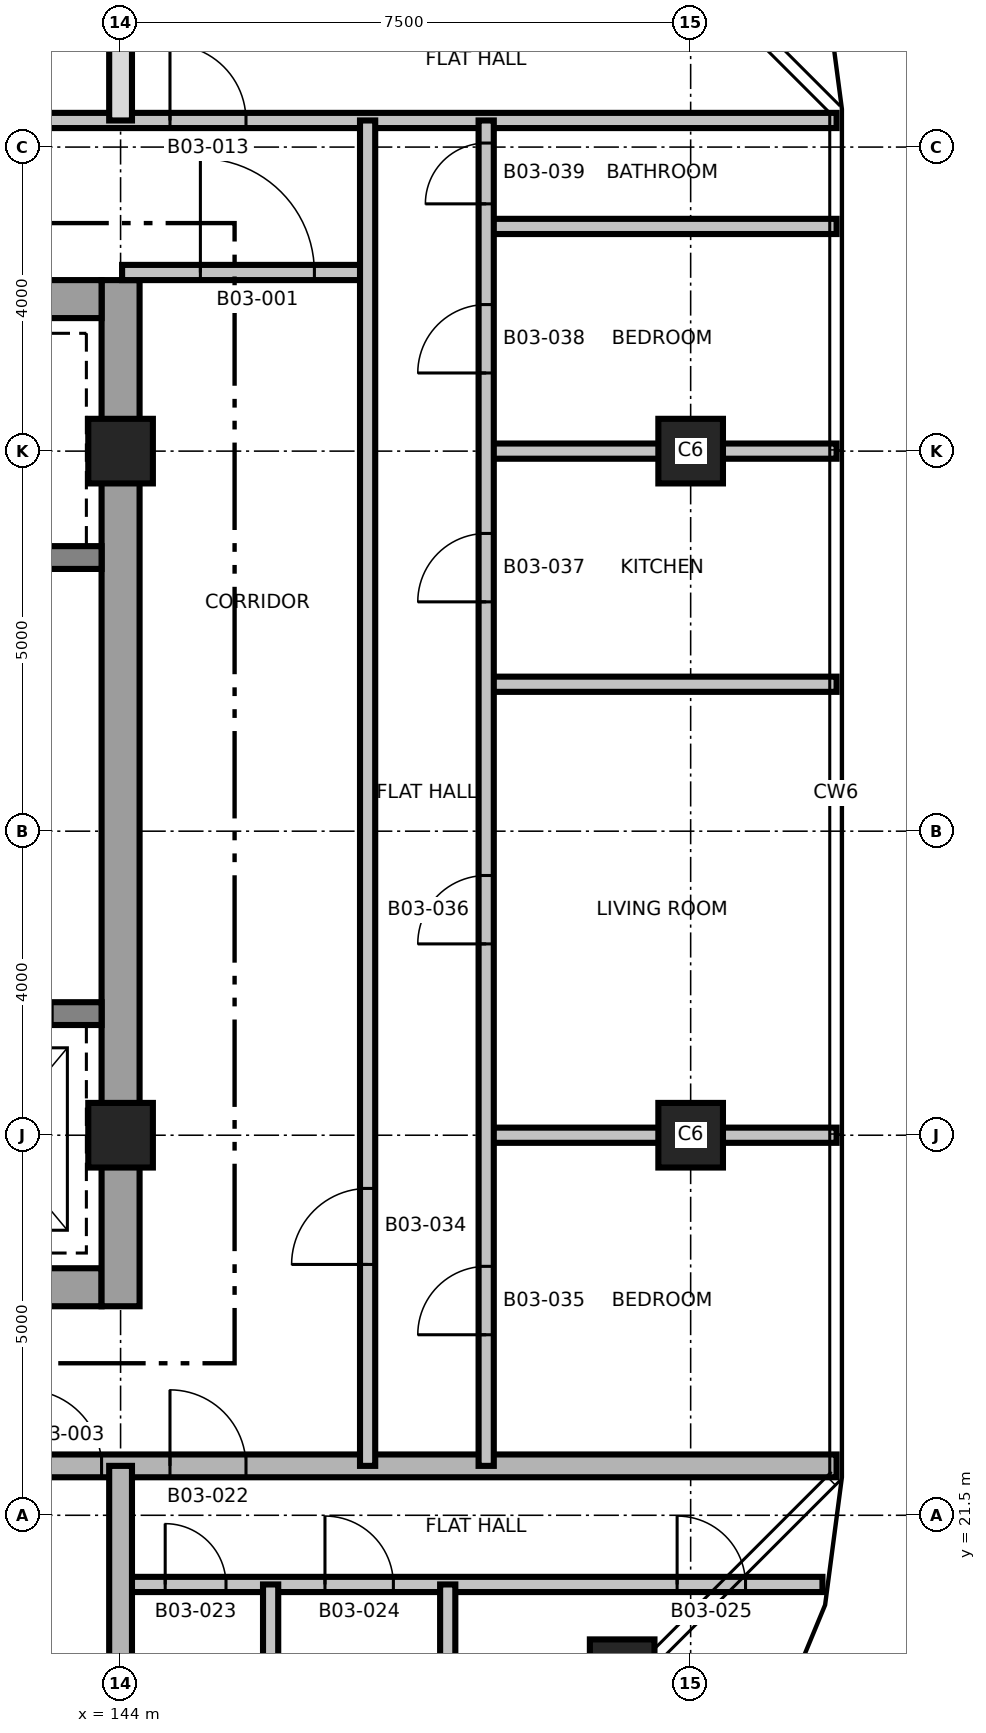
"""IFC4 building model, lengths in metres.
Left out: names, types, materials, properties, quantities, classifications, styles, units other than length and angle.
Written with IfcOpenShell. Run it as: python <this file> out.ifc"""

import sys

from ifc_helpers import new_model, si_unit, direction, frame, frame_2d, origin, origin_2d, place, context, subcontext, project, spatial, rectangle, extrude, element, fill, save


model = new_model("IFC4")
c1 = context("Model", 3, precision=1e-05, world=origin(), true_north=direction((0.0, 1.0)))
c2 = subcontext(c1, "Body", "Model", "MODEL_VIEW")
j1 = project(units=[si_unit("LENGTHUNIT", "METRE"), si_unit("PLANEANGLEUNIT", "RADIAN")], contexts=[c1])
p1 = place(None, origin())
s1 = spatial("IfcSite", under=j1, at=p1, CompositionType="ELEMENT")
p2 = place(p1, origin())
s2 = spatial("IfcBuilding", under=s1, at=p2, CompositionType="ELEMENT")
p3 = place(p2, frame((0.0, 0.0, 59.4)))
s3 = spatial("IfcBuildingStorey", under=s2, at=p3, CompositionType="ELEMENT", Elevation=59.4)
p4 = place(p3, frame((128.75, 24.5, 0.0), z_axis=(0.0, 0.0, 1.0), x_axis=(1.0, 0.0, 0.0)))
e1 = element("IfcWall", 1, at=p4, inside=s3, PredefinedType="SHEAR", context=c2, shape_type="SweptSolid", body=[
    extrude(rectangle(XDim=15.0, YDim=0.5, at=frame_2d((7.5, 0.0))), origin(), (0.0, 0.0, 1.0), 3.7),
])
p5 = place(p4, frame((9.65, 0.0, 0.0)))
e2 = element("IfcOpeningElement", 2, at=p5, cuts=e1, PredefinedType="OPENING", context=c2, shape_type="SweptSolid", body=[
    extrude(rectangle(XDim=1.5, YDim=2.1, at=frame_2d((0.75, 1.05))), frame((0.0, 0.26, 0.0), z_axis=(0.0, -1.0, 0.0), x_axis=(1.0, 0.0, 0.0)), (0.0, 0.0, 1.0), 0.52),
])
p6 = place(p4, frame((1.25, 0.0, 0.0)))
e3 = element("IfcOpeningElement", 3, at=p6, cuts=e1, PredefinedType="OPENING", context=c2, shape_type="SweptSolid", body=[
    extrude(rectangle(XDim=0.9, YDim=2.1, at=frame_2d((0.45, 1.05))), frame((0.0, 0.26, 0.0), z_axis=(0.0, -1.0, 0.0), x_axis=(1.0, 0.0, 0.0)), (0.0, 0.0, 1.0), 0.52),
])
p7 = place(p3, frame((144.0, 24.25, 0.0), z_axis=(0.0, 0.0, 1.0), x_axis=(0.0, 1.0, 0.0)))
e4 = element("IfcWall", 4, at=p7, inside=s3, PredefinedType="SHEAR", context=c2, shape_type="SweptSolid", body=[
    extrude(rectangle(XDim=13.5, YDim=0.5, at=frame_2d((6.75, 0.0))), origin(), (0.0, 0.0, 1.0), 3.7),
])
p8 = place(p3, frame((128.75, 37.5, 0.0), z_axis=(0.0, 0.0, 1.0), x_axis=(1.0, 0.0, 0.0)))
e5 = element("IfcWall", 5, at=p8, inside=s3, PredefinedType="SHEAR", context=c2, shape_type="SweptSolid", body=[
    extrude(rectangle(XDim=15.0, YDim=0.5, at=frame_2d((7.5, 0.0))), origin(), (0.0, 0.0, 1.0), 3.7),
])
p9 = place(p8, frame((9.65, 0.0, 0.0)))
e6 = element("IfcOpeningElement", 6, at=p9, cuts=e5, PredefinedType="OPENING", context=c2, shape_type="SweptSolid", body=[
    extrude(rectangle(XDim=1.5, YDim=2.1, at=frame_2d((0.75, 1.05))), frame((0.0, 0.26, 0.0), z_axis=(0.0, -1.0, 0.0), x_axis=(1.0, 0.0, 0.0)), (0.0, 0.0, 1.0), 0.52),
])
p10 = place(p8, frame((12.85, 0.0, 0.0)))
e7 = element("IfcOpeningElement", 7, at=p10, cuts=e5, PredefinedType="OPENING", context=c2, shape_type="SweptSolid", body=[
    extrude(rectangle(XDim=0.9, YDim=2.1, at=frame_2d((0.45, 1.05))), frame((0.0, 0.26, 0.0), z_axis=(0.0, -1.0, 0.0), x_axis=(1.0, 0.0, 0.0)), (0.0, 0.0, 1.0), 0.52),
])
p11 = place(p8, frame((3.8, 0.0, 0.0)))
e8 = element("IfcOpeningElement", 8, at=p11, cuts=e5, PredefinedType="OPENING", context=c2, shape_type="SweptSolid", body=[
    extrude(rectangle(XDim=0.9, YDim=2.1, at=frame_2d((0.45, 1.05))), frame((0.0, 0.26, 0.0), z_axis=(0.0, -1.0, 0.0), x_axis=(1.0, 0.0, 0.0)), (0.0, 0.0, 1.0), 0.52),
])
p12 = place(p8, frame((6.7, 0.0, 0.0)))
e9 = element("IfcOpeningElement", 9, at=p12, cuts=e5, PredefinedType="OPENING", context=c2, shape_type="SweptSolid", body=[
    extrude(rectangle(XDim=0.9, YDim=2.1, at=frame_2d((0.45, 1.05))), frame((0.0, 0.26, 0.0), z_axis=(0.0, -1.0, 0.0), x_axis=(1.0, 0.0, 0.0)), (0.0, 0.0, 1.0), 0.52),
])
p13 = place(p3, frame((141.05, 28.1, 0.0), z_axis=(0.0, 0.0, 1.0), x_axis=(1.0, 0.0, 0.0)))
e10 = element("IfcWall", 10, at=p13, inside=s3, PredefinedType="SHEAR", context=c2, shape_type="SweptSolid", body=[
    extrude(rectangle(XDim=2.7, YDim=0.3, at=frame_2d((1.35, 0.0))), origin(), (0.0, 0.0, 1.0), 3.7),
])
p14 = place(p13, frame((0.75, 0.0, 0.0)))
e11 = element("IfcOpeningElement", 11, at=p14, cuts=e10, PredefinedType="OPENING", context=c2, shape_type="SweptSolid", body=[
    extrude(rectangle(XDim=1.3, YDim=2.4, at=frame_2d((0.65, 1.2))), frame((0.0, 0.16, 0.0), z_axis=(0.0, -1.0, 0.0), x_axis=(1.0, 0.0, 0.0)), (0.0, 0.0, 1.0), 0.32),
])
p15 = place(p3, frame((141.05, 34.1, 0.0), z_axis=(0.0, 0.0, 1.0), x_axis=(1.0, 0.0, 0.0)))
e12 = element("IfcWall", 12, at=p15, inside=s3, PredefinedType="SHEAR", context=c2, shape_type="SweptSolid", body=[
    extrude(rectangle(XDim=2.7, YDim=0.3, at=frame_2d((1.35, 0.0))), origin(), (0.0, 0.0, 1.0), 3.7),
])
for number, where, z_axis, x_axis in (
    (13, (150.599, 19.442, 0.0), (0.0, 0.0, 1.0), (1.0, 0.0, 0.0)),
    (14, (144.0, 26.5, 0.0), (0.0, 0.0, 1.0), (1.0, 0.0, 0.0)),
    (15, (151.5, 26.5, 0.0), (0.0, 0.0, 1.0), (1.0, 0.0, 0.0)),
    (16, (144.0, 35.5, 0.0), (0.0, 0.0, 1.0), (1.0, 0.0, 0.0)),
    (17, (151.5, 35.5, 0.0), (0.0, 0.0, 1.0), (1.0, 0.0, 0.0)),
):
    element("IfcColumn", number, at=place(p3, frame(where, z_axis=z_axis, x_axis=x_axis)), inside=s3, PredefinedType="COLUMN", context=c2, shape_type="SweptSolid", body=[
        extrude(rectangle(XDim=0.85, YDim=0.85, at=origin_2d()), origin(), (0.0, 0.0, 1.0), 3.7),
    ])
p16 = place(p3, frame((144.0, 20.59, 0.0), z_axis=(0.0, 0.0, 1.0), x_axis=(1.0, 0.0, 0.0)))
e18 = element("IfcWall", 18, at=p16, inside=s3, PredefinedType="PARTITIONING", context=c2, shape_type="SweptSolid", body=[
    extrude(rectangle(XDim=9.234, YDim=0.2, at=frame_2d((4.617, 0.0))), origin(), (0.0, 0.0, 1.0), 3.4),
])
p17 = place(p16, frame((0.587, 0.0, 0.0)))
e19 = element("IfcOpeningElement", 19, at=p17, cuts=e18, PredefinedType="OPENING", context=c2, shape_type="SweptSolid", body=[
    extrude(rectangle(XDim=0.8, YDim=2.1, at=frame_2d((0.4, 1.05))), frame((0.0, 0.11, 0.0), z_axis=(0.0, -1.0, 0.0), x_axis=(1.0, 0.0, 0.0)), (0.0, 0.0, 1.0), 0.22),
])
p18 = place(p16, frame((2.689, 0.0, 0.0)))
e20 = element("IfcOpeningElement", 20, at=p18, cuts=e18, PredefinedType="OPENING", context=c2, shape_type="SweptSolid", body=[
    extrude(rectangle(XDim=0.9, YDim=2.1, at=frame_2d((0.45, 1.05))), frame((0.0, 0.11, 0.0), z_axis=(0.0, -1.0, 0.0), x_axis=(1.0, 0.0, 0.0)), (0.0, 0.0, 1.0), 0.22),
])
p19 = place(p16, frame((7.322, 0.0, 0.0)))
e21 = element("IfcOpeningElement", 21, at=p19, cuts=e18, PredefinedType="OPENING", context=c2, shape_type="SweptSolid", body=[
    extrude(rectangle(XDim=0.9, YDim=2.1, at=frame_2d((0.45, 1.05))), frame((0.0, 0.11, 0.0), z_axis=(0.0, -1.0, 0.0), x_axis=(1.0, 0.0, 0.0)), (0.0, 0.0, 1.0), 0.22),
])
p20 = place(p3, frame((119.58, 22.15, 0.0), z_axis=(0.0, 0.0, 1.0), x_axis=(1.0, 0.0, 0.0)))
e22 = element("IfcWall", 22, at=p20, inside=s3, PredefinedType="SHEAR", context=c2, shape_type="SweptSolid", body=[
    extrude(rectangle(XDim=33.84, YDim=0.3, at=frame_2d((16.92, 0.0))), origin(), (0.0, 0.0, 1.0), 3.4),
])
p21 = place(p20, frame((23.17, 0.0, 0.0)))
e23 = element("IfcOpeningElement", 23, at=p21, cuts=e22, PredefinedType="OPENING", context=c2, shape_type="SweptSolid", body=[
    extrude(rectangle(XDim=1.0, YDim=2.1, at=frame_2d((0.5, 1.05))), frame((0.0, 0.16, 0.0), z_axis=(0.0, -1.0, 0.0), x_axis=(1.0, 0.0, 0.0)), (0.0, 0.0, 1.0), 0.32),
])
p22 = place(p20, frame((11.52, 0.0, 0.0)))
e24 = element("IfcOpeningElement", 24, at=p22, cuts=e22, PredefinedType="OPENING", context=c2, shape_type="SweptSolid", body=[
    extrude(rectangle(XDim=1.0, YDim=2.1, at=frame_2d((0.5, 1.05))), frame((0.0, 0.16, 0.0), z_axis=(0.0, -1.0, 0.0), x_axis=(1.0, 0.0, 0.0)), (0.0, 0.0, 1.0), 0.32),
])
p23 = place(p20, frame((25.07, 0.0, 0.0)))
e25 = element("IfcOpeningElement", 25, at=p23, cuts=e22, PredefinedType="OPENING", context=c2, shape_type="SweptSolid", body=[
    extrude(rectangle(XDim=1.0, YDim=2.1, at=frame_2d((0.5, 1.05))), frame((0.0, 0.16, 0.0), z_axis=(0.0, -1.0, 0.0), x_axis=(1.0, 0.0, 0.0)), (0.0, 0.0, 1.0), 0.32),
])
p24 = place(p20, frame((17.17, 0.0, 0.0)))
e26 = element("IfcOpeningElement", 26, at=p24, cuts=e22, PredefinedType="OPENING", context=c2, shape_type="SweptSolid", body=[
    extrude(rectangle(XDim=0.9, YDim=2.1, at=frame_2d((0.45, 1.05))), frame((0.0, 0.16, 0.0), z_axis=(0.0, -1.0, 0.0), x_axis=(1.0, 0.0, 0.0)), (0.0, 0.0, 1.0), 0.32),
])
for number, where, z_axis, x_axis in (
    (27, (148.81, 26.5, 0.0), (0.0, 0.0, 1.0), (1.0, 0.0, 0.0)),
    (28, (148.81, 32.433, 0.0), (0.0, 0.0, 1.0), (1.0, 0.0, 0.0)),
    (29, (148.81, 35.5, 0.0), (0.0, 0.0, 1.0), (1.0, 0.0, 0.0)),
):
    element("IfcWall", number, at=place(p3, frame(where, z_axis=z_axis, x_axis=x_axis)), inside=s3, PredefinedType="PARTITIONING", context=c2, shape_type="SweptSolid", body=[
        extrude(rectangle(XDim=4.61, YDim=0.2, at=frame_2d((2.305, 0.0))), origin(), (0.0, 0.0, 1.0), 3.4),
    ])
p25 = place(p3, frame((144.02, 37.85, 0.0), z_axis=(0.0, 0.0, 1.0), x_axis=(1.0, 0.0, 0.0)))
e30 = element("IfcWall", 30, at=p25, inside=s3, PredefinedType="PARTITIONING", context=c2, shape_type="SweptSolid", body=[
    extrude(rectangle(XDim=3.23, YDim=0.2, at=frame_2d((1.615, 0.0))), origin(), (0.0, 0.0, 1.0), 3.4),
])
p26 = place(p25, frame((1.03, 0.0, 0.0)))
e31 = element("IfcOpeningElement", 31, at=p26, cuts=e30, PredefinedType="OPENING", context=c2, shape_type="SweptSolid", body=[
    extrude(rectangle(XDim=1.5, YDim=2.1, at=frame_2d((0.75, 1.05))), frame((0.0, 0.11, 0.0), z_axis=(0.0, -1.0, 0.0), x_axis=(1.0, 0.0, 0.0)), (0.0, 0.0, 1.0), 0.22),
])
p27 = place(p3, frame((148.81, 38.456, 0.0), z_axis=(0.0, 0.0, 1.0), x_axis=(1.0, 0.0, 0.0)))
e32 = element("IfcWall", 32, at=p27, inside=s3, PredefinedType="PARTITIONING", context=c2, shape_type="SweptSolid", body=[
    extrude(rectangle(XDim=4.61, YDim=0.2, at=frame_2d((2.305, 0.0))), origin(), (0.0, 0.0, 1.0), 3.4),
])
p28 = place(p3, frame((119.58, 39.85, 0.0), z_axis=(0.0, 0.0, 1.0), x_axis=(1.0, 0.0, 0.0)))
e33 = element("IfcWall", 33, at=p28, inside=s3, PredefinedType="PARTITIONING", context=c2, shape_type="SweptSolid", body=[
    extrude(rectangle(XDim=33.84, YDim=0.2, at=frame_2d((16.92, 0.0))), origin(), (0.0, 0.0, 1.0), 3.4),
])
p29 = place(p28, frame((15.27, 0.0, 0.0)))
e34 = element("IfcOpeningElement", 34, at=p29, cuts=e33, PredefinedType="OPENING", context=c2, shape_type="SweptSolid", body=[
    extrude(rectangle(XDim=1.0, YDim=2.1, at=frame_2d((0.5, 1.05))), frame((0.0, 0.11, 0.0), z_axis=(0.0, -1.0, 0.0), x_axis=(1.0, 0.0, 0.0)), (0.0, 0.0, 1.0), 0.22),
])
p30 = place(p28, frame((25.07, 0.0, 0.0)))
e35 = element("IfcOpeningElement", 35, at=p30, cuts=e33, PredefinedType="OPENING", context=c2, shape_type="SweptSolid", body=[
    extrude(rectangle(XDim=1.0, YDim=2.1, at=frame_2d((0.5, 1.05))), frame((0.0, 0.11, 0.0), z_axis=(0.0, -1.0, 0.0), x_axis=(1.0, 0.0, 0.0)), (0.0, 0.0, 1.0), 0.22),
])
p31 = place(p3, frame((144.0, 15.58, 0.0), z_axis=(0.0, 0.0, 1.0), x_axis=(0.0, 1.0, 0.0)))
e36 = element("IfcWall", 36, at=p31, inside=s3, PredefinedType="SHEAR", context=c2, shape_type="SweptSolid", body=[
    extrude(rectangle(XDim=6.57, YDim=0.3, at=frame_2d((3.285, 0.0))), origin(), (0.0, 0.0, 1.0), 3.4),
])
p32 = place(p3, frame((144.0, 39.85, 0.0), z_axis=(0.0, 0.0, 1.0), x_axis=(0.0, 1.0, 0.0)))
e37 = element("IfcWall", 37, at=p32, inside=s3, PredefinedType="PARTITIONING", context=c2, shape_type="SweptSolid", body=[
    extrude(rectangle(XDim=6.57, YDim=0.3, at=frame_2d((3.285, 0.0))), origin(), (0.0, 0.0, 1.0), 3.4),
])
p33 = place(p3, frame((145.974, 15.58, 0.0), z_axis=(0.0, 0.0, 1.0), x_axis=(0.0, 1.0, 0.0)))
e38 = element("IfcWall", 38, at=p33, inside=s3, PredefinedType="PARTITIONING", context=c2, shape_type="SweptSolid", body=[
    extrude(rectangle(XDim=5.01, YDim=0.2, at=frame_2d((2.505, 0.0))), origin(), (0.0, 0.0, 1.0), 3.4),
])
p34 = place(p3, frame((147.25, 22.15, 0.0), z_axis=(0.0, 0.0, 1.0), x_axis=(0.0, 1.0, 0.0)))
e39 = element("IfcWall", 39, at=p34, inside=s3, PredefinedType="PARTITIONING", context=c2, shape_type="SweptSolid", body=[
    extrude(rectangle(XDim=17.7, YDim=0.2, at=frame_2d((8.85, 0.0))), origin(), (0.0, 0.0, 1.0), 3.4),
])
p35 = place(p34, frame((2.65, 0.0, 0.0)))
e40 = element("IfcOpeningElement", 40, at=p35, cuts=e39, PredefinedType="OPENING", context=c2, shape_type="SweptSolid", body=[
    extrude(rectangle(XDim=1.0, YDim=2.1, at=frame_2d((0.5, 1.05))), frame((0.0, 0.11, 0.0), z_axis=(0.0, -1.0, 0.0), x_axis=(1.0, 0.0, 0.0)), (0.0, 0.0, 1.0), 0.22),
])
p36 = place(p3, frame((148.304, 15.752, 0.0), z_axis=(0.0, 0.0, 1.0), x_axis=(0.0, 1.0, 0.0)))
e41 = element("IfcWall", 41, at=p36, inside=s3, PredefinedType="PARTITIONING", context=c2, shape_type="SweptSolid", body=[
    extrude(rectangle(XDim=4.838, YDim=0.2, at=frame_2d((2.419, 0.0))), origin(), (0.0, 0.0, 1.0), 3.4),
])
p37 = place(p3, frame((148.81, 22.15, 0.0), z_axis=(0.0, 0.0, 1.0), x_axis=(0.0, 1.0, 0.0)))
e42 = element("IfcWall", 42, at=p37, inside=s3, PredefinedType="PARTITIONING", context=c2, shape_type="SweptSolid", body=[
    extrude(rectangle(XDim=17.7, YDim=0.2, at=frame_2d((8.85, 0.0))), origin(), (0.0, 0.0, 1.0), 3.4),
])
p38 = place(p37, frame((1.725, 0.0, 0.0)))
e43 = element("IfcOpeningElement", 43, at=p38, cuts=e42, PredefinedType="OPENING", context=c2, shape_type="SweptSolid", body=[
    extrude(rectangle(XDim=0.9, YDim=2.1, at=frame_2d((0.45, 1.05))), frame((0.0, 0.11, 0.0), z_axis=(0.0, -1.0, 0.0), x_axis=(1.0, 0.0, 0.0)), (0.0, 0.0, 1.0), 0.22),
])
p39 = place(p37, frame((6.867, 0.0, 0.0)))
e44 = element("IfcOpeningElement", 44, at=p39, cuts=e42, PredefinedType="OPENING", context=c2, shape_type="SweptSolid", body=[
    extrude(rectangle(XDim=0.9, YDim=2.1, at=frame_2d((0.45, 1.05))), frame((0.0, 0.11, 0.0), z_axis=(0.0, -1.0, 0.0), x_axis=(1.0, 0.0, 0.0)), (0.0, 0.0, 1.0), 0.22),
])
p40 = place(p37, frame((11.367, 0.0, 0.0)))
e45 = element("IfcOpeningElement", 45, at=p40, cuts=e42, PredefinedType="OPENING", context=c2, shape_type="SweptSolid", body=[
    extrude(rectangle(XDim=0.9, YDim=2.1, at=frame_2d((0.45, 1.05))), frame((0.0, 0.11, 0.0), z_axis=(0.0, -1.0, 0.0), x_axis=(1.0, 0.0, 0.0)), (0.0, 0.0, 1.0), 0.22),
])
p41 = place(p37, frame((14.378, 0.0, 0.0)))
e46 = element("IfcOpeningElement", 46, at=p41, cuts=e42, PredefinedType="OPENING", context=c2, shape_type="SweptSolid", body=[
    extrude(rectangle(XDim=0.9, YDim=2.1, at=frame_2d((0.45, 1.05))), frame((0.0, 0.11, 0.0), z_axis=(0.0, -1.0, 0.0), x_axis=(1.0, 0.0, 0.0)), (0.0, 0.0, 1.0), 0.22),
])
p42 = place(p37, frame((16.603, 0.0, 0.0)))
e47 = element("IfcOpeningElement", 47, at=p42, cuts=e42, PredefinedType="OPENING", context=c2, shape_type="SweptSolid", body=[
    extrude(rectangle(XDim=0.8, YDim=2.1, at=frame_2d((0.4, 1.05))), frame((0.0, 0.11, 0.0), z_axis=(0.0, -1.0, 0.0), x_axis=(1.0, 0.0, 0.0)), (0.0, 0.0, 1.0), 0.22),
])
p43 = place(p26, origin())
e48 = element("IfcDoor", 48, at=p43, inside=s3, OperationType="SINGLE_SWING_LEFT", PredefinedType="DOOR", context=c2, shape_type="SweptSolid", body=[
    extrude(rectangle(XDim=1.5, YDim=2.1, at=frame_2d((0.75, 1.05))), frame((0.0, 0.025, 0.0), z_axis=(0.0, -1.0, 0.0), x_axis=(1.0, 0.0, 0.0)), (0.0, 0.0, 1.0), 0.05),
])
fill(e31, e48)
p44 = place(p21, origin())
e49 = element("IfcDoor", 49, at=p44, inside=s3, OperationType="SINGLE_SWING_LEFT", PredefinedType="DOOR", context=c2, shape_type="SweptSolid", body=[
    extrude(rectangle(XDim=1.0, YDim=2.1, at=frame_2d((0.5, 1.05))), frame((0.0, 0.025, 0.0), z_axis=(0.0, -1.0, 0.0), x_axis=(1.0, 0.0, 0.0)), (0.0, 0.0, 1.0), 0.05),
])
fill(e23, e49)
p45 = place(p30, origin())
e50 = element("IfcDoor", 50, at=p45, inside=s3, OperationType="SINGLE_SWING_LEFT", PredefinedType="DOOR", context=c2, shape_type="SweptSolid", body=[
    extrude(rectangle(XDim=1.0, YDim=2.1, at=frame_2d((0.5, 1.05))), frame((0.0, 0.025, 0.0), z_axis=(0.0, -1.0, 0.0), x_axis=(1.0, 0.0, 0.0)), (0.0, 0.0, 1.0), 0.05),
])
fill(e35, e50)
p46 = place(p23, origin())
e51 = element("IfcDoor", 51, at=p46, inside=s3, OperationType="SINGLE_SWING_RIGHT", PredefinedType="DOOR", context=c2, shape_type="SweptSolid", body=[
    extrude(rectangle(XDim=1.0, YDim=2.1, at=frame_2d((0.5, 1.05))), frame((0.0, 0.025, 0.0), z_axis=(0.0, -1.0, 0.0), x_axis=(1.0, 0.0, 0.0)), (0.0, 0.0, 1.0), 0.05),
])
fill(e25, e51)
p47 = place(p17, origin())
e52 = element("IfcDoor", 52, at=p47, inside=s3, OperationType="SINGLE_SWING_LEFT", PredefinedType="DOOR", context=c2, shape_type="SweptSolid", body=[
    extrude(rectangle(XDim=0.8, YDim=2.1, at=frame_2d((0.4, 1.05))), frame((0.0, 0.025, 0.0), z_axis=(0.0, -1.0, 0.0), x_axis=(1.0, 0.0, 0.0)), (0.0, 0.0, 1.0), 0.05),
])
fill(e19, e52)
p48 = place(p18, origin())
e53 = element("IfcDoor", 53, at=p48, inside=s3, OperationType="SINGLE_SWING_RIGHT", PredefinedType="DOOR", context=c2, shape_type="SweptSolid", body=[
    extrude(rectangle(XDim=0.9, YDim=2.1, at=frame_2d((0.45, 1.05))), frame((0.0, 0.025, 0.0), z_axis=(0.0, -1.0, 0.0), x_axis=(1.0, 0.0, 0.0)), (0.0, 0.0, 1.0), 0.05),
])
fill(e20, e53)
p49 = place(p19, origin())
e54 = element("IfcDoor", 54, at=p49, inside=s3, OperationType="SINGLE_SWING_LEFT", PredefinedType="DOOR", context=c2, shape_type="SweptSolid", body=[
    extrude(rectangle(XDim=0.9, YDim=2.1, at=frame_2d((0.45, 1.05))), frame((0.0, 0.025, 0.0), z_axis=(0.0, -1.0, 0.0), x_axis=(1.0, 0.0, 0.0)), (0.0, 0.0, 1.0), 0.05),
])
fill(e21, e54)
p50 = place(p35, origin())
e55 = element("IfcDoor", 55, at=p50, inside=s3, OperationType="SINGLE_SWING_RIGHT", PredefinedType="DOOR", context=c2, shape_type="SweptSolid", body=[
    extrude(rectangle(XDim=1.0, YDim=2.1, at=frame_2d((0.5, 1.05))), frame((0.0, 0.025, 0.0), z_axis=(0.0, -1.0, 0.0), x_axis=(1.0, 0.0, 0.0)), (0.0, 0.0, 1.0), 0.05),
])
fill(e40, e55)
p51 = place(p38, origin())
e56 = element("IfcDoor", 56, at=p51, inside=s3, OperationType="SINGLE_SWING_LEFT", PredefinedType="DOOR", context=c2, shape_type="SweptSolid", body=[
    extrude(rectangle(XDim=0.9, YDim=2.1, at=frame_2d((0.45, 1.05))), frame((0.0, 0.025, 0.0), z_axis=(0.0, -1.0, 0.0), x_axis=(1.0, 0.0, 0.0)), (0.0, 0.0, 1.0), 0.05),
])
fill(e43, e56)
p52 = place(p39, origin())
e57 = element("IfcDoor", 57, at=p52, inside=s3, OperationType="SINGLE_SWING_RIGHT", PredefinedType="DOOR", context=c2, shape_type="SweptSolid", body=[
    extrude(rectangle(XDim=0.9, YDim=2.1, at=frame_2d((0.45, 1.05))), frame((0.0, 0.025, 0.0), z_axis=(0.0, -1.0, 0.0), x_axis=(1.0, 0.0, 0.0)), (0.0, 0.0, 1.0), 0.05),
])
fill(e44, e57)
p53 = place(p40, origin())
e58 = element("IfcDoor", 58, at=p53, inside=s3, OperationType="SINGLE_SWING_LEFT", PredefinedType="DOOR", context=c2, shape_type="SweptSolid", body=[
    extrude(rectangle(XDim=0.9, YDim=2.1, at=frame_2d((0.45, 1.05))), frame((0.0, 0.025, 0.0), z_axis=(0.0, -1.0, 0.0), x_axis=(1.0, 0.0, 0.0)), (0.0, 0.0, 1.0), 0.05),
])
fill(e45, e58)
p54 = place(p41, origin())
e59 = element("IfcDoor", 59, at=p54, inside=s3, OperationType="SINGLE_SWING_RIGHT", PredefinedType="DOOR", context=c2, shape_type="SweptSolid", body=[
    extrude(rectangle(XDim=0.9, YDim=2.1, at=frame_2d((0.45, 1.05))), frame((0.0, 0.025, 0.0), z_axis=(0.0, -1.0, 0.0), x_axis=(1.0, 0.0, 0.0)), (0.0, 0.0, 1.0), 0.05),
])
fill(e46, e59)
p55 = place(p42, origin())
e60 = element("IfcDoor", 60, at=p55, inside=s3, OperationType="SINGLE_SWING_LEFT", PredefinedType="DOOR", context=c2, shape_type="SweptSolid", body=[
    extrude(rectangle(XDim=0.8, YDim=2.1, at=frame_2d((0.4, 1.05))), frame((0.0, 0.025, 0.0), z_axis=(0.0, -1.0, 0.0), x_axis=(1.0, 0.0, 0.0)), (0.0, 0.0, 1.0), 0.05),
])
fill(e47, e60)
save(model, sys.argv[1])
